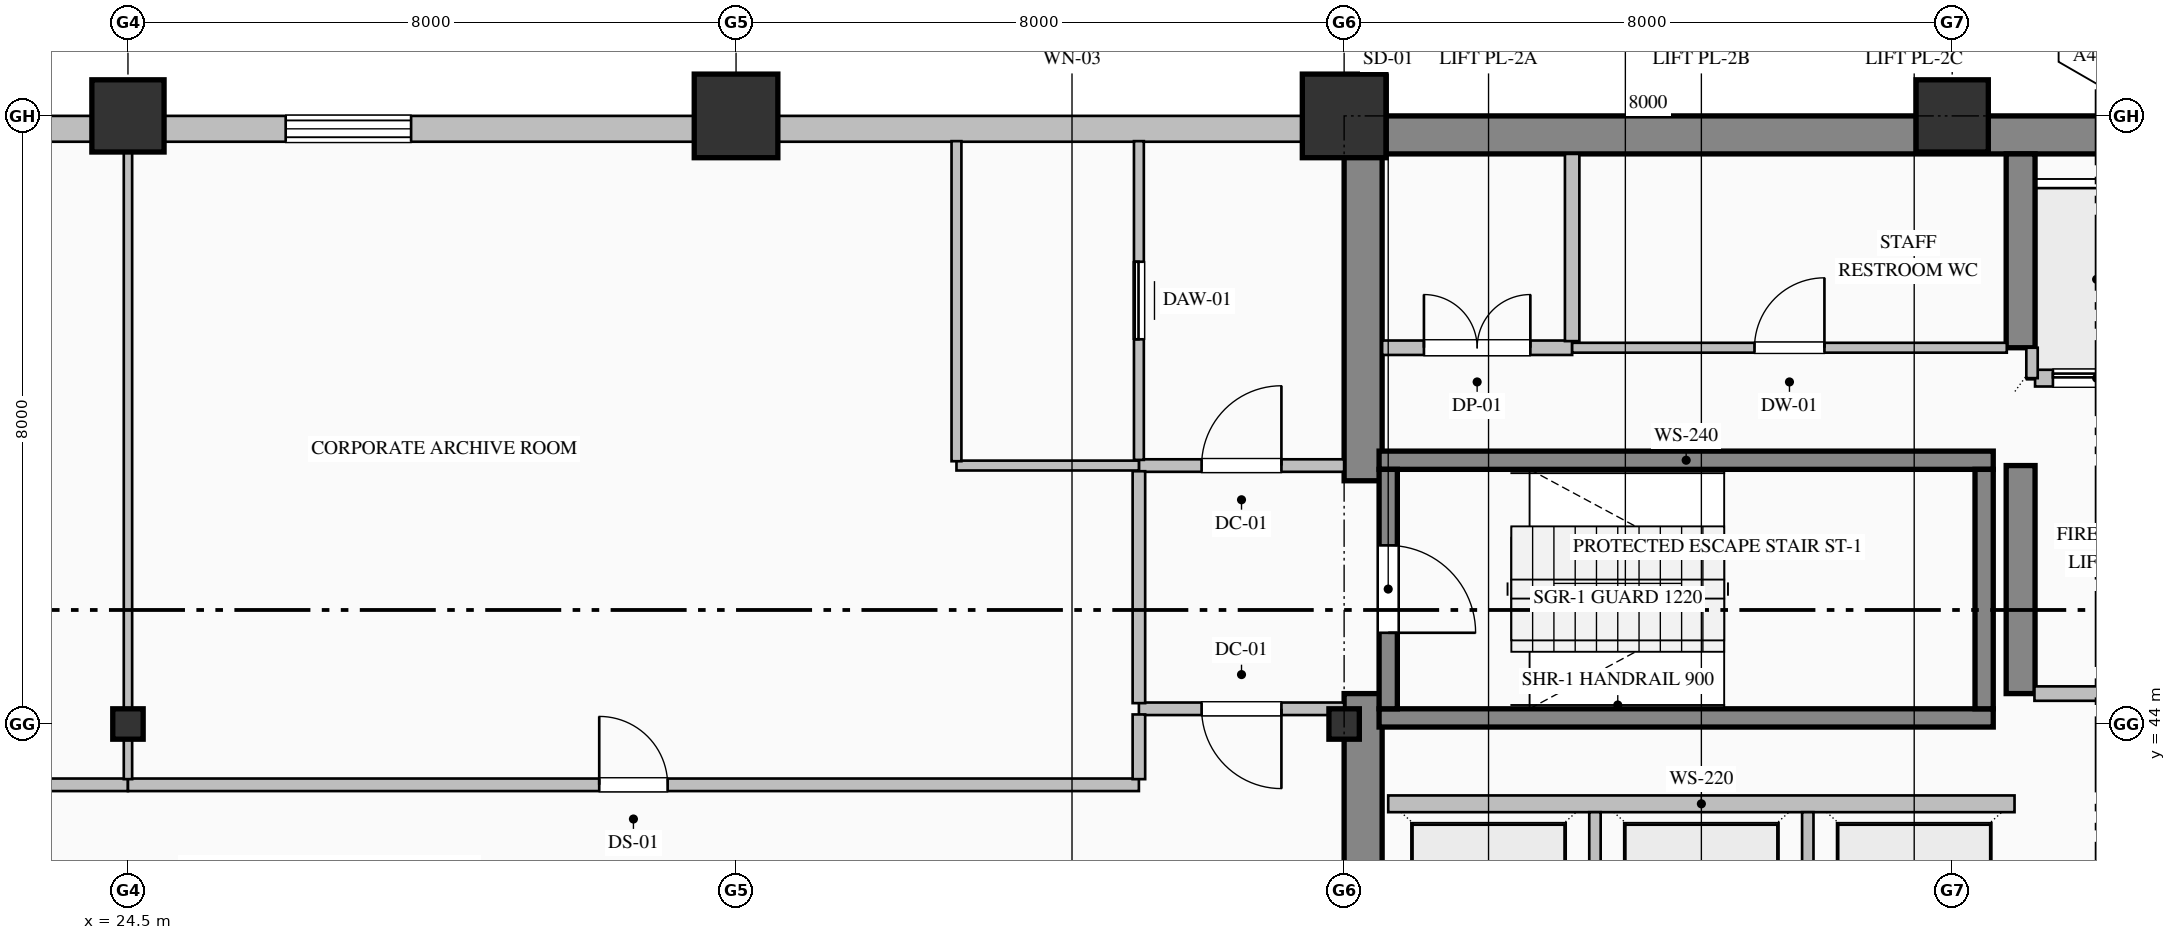
"""IFC4 building model, lengths in metres.
Left out: names, types, materials, properties, quantities, classifications, styles, units other than length and angle.
Written with IfcOpenShell. Run it as: python <this file> out.ifc"""

import sys

from ifc_helpers import new_model, si_unit, direction, frame, frame_2d, origin, origin_2d, place, context, subcontext, project, spatial, rectangle, hollow_rectangle, i_section, extrude, element, fill, save


model = new_model("IFC4")
c1 = context("Model", 3, precision=1e-05, world=origin(), true_north=direction((0.0, 1.0)))
c2 = subcontext(c1, "Body", "Model", "MODEL_VIEW")
j1 = project(units=[si_unit("LENGTHUNIT", "METRE"), si_unit("PLANEANGLEUNIT", "RADIAN")], contexts=[c1])
p1 = place(None, origin())
s1 = spatial("IfcSite", under=j1, at=p1, CompositionType="ELEMENT")
p2 = place(p1, origin())
s2 = spatial("IfcBuilding", under=s1, at=p2, CompositionType="ELEMENT")
p3 = place(p2, frame((0.0, 0.0, 147.0)))
s3 = spatial("IfcBuildingStorey", under=s2, at=p3, CompositionType="ELEMENT", Elevation=147.0)
p4 = place(p3, frame((40.5, 51.75, 0.0), z_axis=(0.0, 0.0, 1.0), x_axis=(1.0, 0.0, 0.0)))
e1 = element("IfcWall", 1, at=p4, inside=s3, PredefinedType="SHEAR", context=c2, shape_type="SweptSolid", body=[
    extrude(rectangle(XDim=23.5, YDim=0.5, at=frame_2d((11.75, 0.0))), origin(), (0.0, 0.0, 1.0), 3.765),
])
p5 = place(p3, frame((40.75, 36.5, 0.0), z_axis=(0.0, 0.0, 1.0), x_axis=(0.0, 1.0, 0.0)))
e2 = element("IfcWall", 2, at=p5, inside=s3, PredefinedType="SHEAR", context=c2, shape_type="SweptSolid", body=[
    extrude(rectangle(XDim=7.9, YDim=0.5, at=frame_2d((3.95, 0.0))), origin(), (0.0, 0.0, 1.0), 3.765),
])
p6 = place(p3, frame((40.75, 47.2, 0.0), z_axis=(0.0, 0.0, 1.0), x_axis=(0.0, 1.0, 0.0)))
e3 = element("IfcWall", 3, at=p6, inside=s3, PredefinedType="SHEAR", context=c2, shape_type="SweptSolid", body=[
    extrude(rectangle(XDim=4.3, YDim=0.5, at=frame_2d((2.15, 0.0))), origin(), (0.0, 0.0, 1.0), 3.765),
])
p7 = place(p3, frame((49.4, 44.4, 0.0), z_axis=(0.0, 0.0, 1.0), x_axis=(0.0, 1.0, 0.0)))
e4 = element("IfcWall", 4, at=p7, inside=s3, PredefinedType="SHEAR", context=c2, shape_type="SweptSolid", body=[
    extrude(rectangle(XDim=3.0, YDim=0.38, at=frame_2d((1.5, 0.0))), origin(), (0.0, 0.0, 1.0), 3.765),
])
p8 = place(p3, frame((49.4, 48.95, 0.0), z_axis=(0.0, 0.0, 1.0), x_axis=(0.0, 1.0, 0.0)))
e5 = element("IfcWall", 5, at=p8, inside=s3, PredefinedType="SHEAR", context=c2, shape_type="SweptSolid", body=[
    extrude(rectangle(XDim=2.55, YDim=0.38, at=frame_2d((1.275, 0.0))), origin(), (0.0, 0.0, 1.0), 3.765),
])
p9 = place(p3, frame((24.5, 44.0, 0.0), z_axis=(0.0, 0.0, 1.0), x_axis=(1.0, 0.0, 0.0)))
e6 = element("IfcColumn", 6, at=p9, inside=s3, PredefinedType="COLUMN", context=c2, shape_type="SweptSolid", body=[
    extrude(i_section(OverallWidth=0.4, OverallDepth=0.4, WebThickness=0.013, FlangeThickness=0.021, FilletRadius=0.022, at=origin_2d()), origin(), (0.0, 0.0, 1.0), 4.0),
])
p10 = place(p3, frame((24.5, 52.0, 0.0), z_axis=(0.0, 0.0, 1.0), x_axis=(1.0, 0.0, 0.0)))
e7 = element("IfcColumn", 7, at=p10, inside=s3, PredefinedType="COLUMN", context=c2, shape_type="SweptSolid", body=[
    extrude(hollow_rectangle(XDim=0.95, YDim=0.95, WallThickness=0.036, at=origin_2d()), origin(), (0.0, 0.0, 1.0), 4.0),
])
p11 = place(p3, frame((32.5, 52.0, 0.0), z_axis=(0.0, 0.0, 1.0), x_axis=(1.0, 0.0, 0.0)))
e8 = element("IfcColumn", 8, at=p11, inside=s3, PredefinedType="COLUMN", context=c2, shape_type="SweptSolid", body=[
    extrude(hollow_rectangle(XDim=1.1, YDim=1.1, WallThickness=0.04, at=origin_2d()), origin(), (0.0, 0.0, 1.0), 4.0),
])
p12 = place(p3, frame((40.5, 44.0, 0.0), z_axis=(0.0, 0.0, 1.0), x_axis=(1.0, 0.0, 0.0)))
e9 = element("IfcColumn", 9, at=p12, inside=s3, PredefinedType="COLUMN", context=c2, shape_type="SweptSolid", body=[
    extrude(i_section(OverallWidth=0.4, OverallDepth=0.4, WebThickness=0.013, FlangeThickness=0.021, FilletRadius=0.022, at=origin_2d()), origin(), (0.0, 0.0, 1.0), 4.0),
])
p13 = place(p3, frame((40.5, 52.0, 0.0), z_axis=(0.0, 0.0, 1.0), x_axis=(1.0, 0.0, 0.0)))
e10 = element("IfcColumn", 10, at=p13, inside=s3, PredefinedType="COLUMN", context=c2, shape_type="SweptSolid", body=[
    extrude(hollow_rectangle(XDim=1.1, YDim=1.1, WallThickness=0.04, at=origin_2d()), origin(), (0.0, 0.0, 1.0), 4.0),
])
p14 = place(p3, frame((48.5, 52.0, 0.0), z_axis=(0.0, 0.0, 1.0), x_axis=(1.0, 0.0, 0.0)))
e11 = element("IfcColumn", 11, at=p14, inside=s3, PredefinedType="COLUMN", context=c2, shape_type="SweptSolid", body=[
    extrude(hollow_rectangle(XDim=0.95, YDim=0.95, WallThickness=0.036, at=origin_2d()), origin(), (0.0, 0.0, 1.0), 4.0),
])
p15 = place(p3, frame((13.0, 51.83, 0.0), z_axis=(0.0, 0.0, 1.0), x_axis=(1.0, 0.0, 0.0)))
e12 = element("IfcWall", 12, at=p15, inside=s3, PredefinedType="SOLIDWALL", context=c2, shape_type="SweptSolid", body=[
    extrude(rectangle(XDim=27.52, YDim=0.34, at=frame_2d((13.76, 0.0))), origin(), (0.0, 0.0, 1.0), 3.265),
])
p16 = place(p15, frame((6.6, 0.0, 0.7)))
e13 = element("IfcOpeningElement", 13, at=p16, cuts=e12, PredefinedType="OPENING", context=c2, shape_type="SweptSolid", body=[
    extrude(rectangle(XDim=1.2, YDim=1.85, at=frame_2d((0.6, 0.925))), frame((0.0, 0.18, 0.0), z_axis=(0.0, -1.0, 0.0), x_axis=(1.0, 0.0, 0.0)), (0.0, 0.0, 1.0), 0.36),
])
p17 = place(p15, frame((13.575, 0.0, 0.85)))
e14 = element("IfcOpeningElement", 14, at=p17, cuts=e12, PredefinedType="OPENING", context=c2, shape_type="SweptSolid", body=[
    extrude(rectangle(XDim=1.65, YDim=1.95, at=frame_2d((0.825, 0.975))), frame((0.0, 0.18, 0.0), z_axis=(0.0, -1.0, 0.0), x_axis=(1.0, 0.0, 0.0)), (0.0, 0.0, 1.0), 0.36),
])
for number, where, z_axis, x_axis in (
    (15, (40.96, 47.47, 0.0), (0.0, 0.0, 1.0), (1.0, 0.0, 0.0)),
    (16, (49.04, 44.08, 0.0), (0.0, 0.0, 1.0), (-1.0, 0.0, 0.0)),
):
    element("IfcWall", number, at=place(p3, frame(where, z_axis=z_axis, x_axis=x_axis)), inside=s3, PredefinedType="SOLIDWALL", context=c2, shape_type="SweptSolid", body=[
        extrude(rectangle(XDim=8.08, YDim=0.24, at=frame_2d((4.04, 0.0))), origin(), (0.0, 0.0, 1.0), 4.0),
    ])
p18 = place(p3, frame((41.08, 47.35, 0.0), z_axis=(0.0, 0.0, 1.0), x_axis=(0.0, -1.0, 0.0)))
e17 = element("IfcWall", 17, at=p18, inside=s3, PredefinedType="SOLIDWALL", context=c2, shape_type="SweptSolid", body=[
    extrude(rectangle(XDim=3.15, YDim=0.24, at=frame_2d((1.575, 0.0))), origin(), (0.0, 0.0, 1.0), 4.0),
])
p19 = place(p18, frame((1.0, 0.0, 0.0)))
e18 = element("IfcOpeningElement", 18, at=p19, cuts=e17, PredefinedType="OPENING", context=c2, shape_type="SweptSolid", body=[
    extrude(rectangle(XDim=1.15, YDim=2.2, at=frame_2d((0.575, 1.1))), frame((0.0, 0.13, 0.0), z_axis=(0.0, -1.0, 0.0), x_axis=(1.0, 0.0, 0.0)), (0.0, 0.0, 1.0), 0.26),
])
p20 = place(p3, frame((48.92, 44.2, 0.0), z_axis=(0.0, 0.0, 1.0), x_axis=(0.0, 1.0, 0.0)))
e19 = element("IfcWall", 19, at=p20, inside=s3, PredefinedType="SOLIDWALL", context=c2, shape_type="SweptSolid", body=[
    extrude(rectangle(XDim=3.15, YDim=0.24, at=frame_2d((1.575, 0.0))), origin(), (0.0, 0.0, 1.0), 4.0),
])
p21 = place(p3, frame((54.71, 48.55, 0.0), z_axis=(0.0, 0.0, 1.0), x_axis=(-1.0, 0.0, 0.0)))
e20 = element("IfcWall", 20, at=p21, inside=s3, PredefinedType="PARTITIONING", context=c2, shape_type="SweptSolid", body=[
    extrude(rectangle(XDim=5.12, YDim=0.22, at=frame_2d((2.56, 0.0))), origin(), (0.0, 0.0, 1.0), 3.765),
])
p22 = place(p21, frame((3.735, 0.0, 0.0)))
e21 = element("IfcOpeningElement", 21, at=p22, cuts=e20, PredefinedType="OPENING", context=c2, shape_type="SweptSolid", body=[
    extrude(rectangle(XDim=1.15, YDim=2.2, at=frame_2d((0.575, 1.1))), frame((0.0, 0.12, 0.0), z_axis=(0.0, -1.0, 0.0), x_axis=(1.0, 0.0, 0.0)), (0.0, 0.0, 1.0), 0.24),
])
p23 = place(p21, frame((0.935, 0.0, 0.0)))
e22 = element("IfcOpeningElement", 22, at=p23, cuts=e20, PredefinedType="OPENING", context=c2, shape_type="SweptSolid", body=[
    extrude(rectangle(XDim=1.15, YDim=2.2, at=frame_2d((0.575, 1.1))), frame((0.0, 0.12, 0.0), z_axis=(0.0, -1.0, 0.0), x_axis=(1.0, 0.0, 0.0)), (0.0, 0.0, 1.0), 0.24),
])
p24 = place(p3, frame((49.55, 48.55, 0.0), z_axis=(0.0, 0.0, 1.0), x_axis=(0.0, 1.0, 0.0)))
e23 = element("IfcWall", 23, at=p24, inside=s3, PredefinedType="PARTITIONING", context=c2, shape_type="SweptSolid", body=[
    extrude(rectangle(XDim=0.4, YDim=0.15, at=frame_2d((0.2, 0.0))), origin(), (0.0, 0.0, 1.0), 3.765),
])
p25 = place(p3, frame((41.08, 42.95, 0.0), z_axis=(0.0, 0.0, 1.0), x_axis=(1.0, 0.0, 0.0)))
e24 = element("IfcWall", 24, at=p25, inside=s3, PredefinedType="PARTITIONING", context=c2, shape_type="SweptSolid", body=[
    extrude(rectangle(XDim=8.24, YDim=0.22, at=frame_2d((4.12, 0.0))), origin(), (0.0, 0.0, 1.0), 3.765),
])
for number, where, z_axis, x_axis in (
    (25, (43.8, 40.76, 0.0), (0.0, 0.0, 1.0), (0.0, 1.0, 0.0)),
    (26, (46.6, 40.76, 0.0), (0.0, 0.0, 1.0), (0.0, 1.0, 0.0)),
):
    element("IfcWall", number, at=place(p3, frame(where, z_axis=z_axis, x_axis=x_axis)), inside=s3, PredefinedType="PARTITIONING", context=c2, shape_type="SweptSolid", body=[
        extrude(rectangle(XDim=2.08, YDim=0.15, at=frame_2d((1.04, 0.0))), origin(), (0.0, 0.0, 1.0), 3.765),
    ])
p26 = place(p3, frame((37.8, 47.4, 0.0), z_axis=(0.0, 0.0, 1.0), x_axis=(1.0, 0.0, 0.0)))
e27 = element("IfcWall", 27, at=p26, inside=s3, PredefinedType="PARTITIONING", context=c2, shape_type="SweptSolid", body=[
    extrude(rectangle(XDim=2.7, YDim=0.165, at=frame_2d((1.35, 0.0))), origin(), (0.0, 0.0, 1.0), 3.765),
])
p27 = place(p26, frame((0.825, 0.0, 0.0)))
e28 = element("IfcOpeningElement", 28, at=p27, cuts=e27, PredefinedType="OPENING", context=c2, shape_type="SweptSolid", body=[
    extrude(rectangle(XDim=1.05, YDim=2.15, at=frame_2d((0.525, 1.075))), frame((0.0, 0.093, 0.0), z_axis=(0.0, -1.0, 0.0), x_axis=(1.0, 0.0, 0.0)), (0.0, 0.0, 1.0), 0.185),
])
p28 = place(p3, frame((40.5, 44.2, 0.0), z_axis=(0.0, 0.0, 1.0), x_axis=(-1.0, 0.0, 0.0)))
e29 = element("IfcWall", 29, at=p28, inside=s3, PredefinedType="PARTITIONING", context=c2, shape_type="SweptSolid", body=[
    extrude(rectangle(XDim=2.7, YDim=0.165, at=frame_2d((1.35, 0.0))), origin(), (0.0, 0.0, 1.0), 3.765),
])
p29 = place(p28, frame((0.825, 0.0, 0.0)))
e30 = element("IfcOpeningElement", 30, at=p29, cuts=e29, PredefinedType="OPENING", context=c2, shape_type="SweptSolid", body=[
    extrude(rectangle(XDim=1.05, YDim=2.15, at=frame_2d((0.525, 1.075))), frame((0.0, 0.093, 0.0), z_axis=(0.0, -1.0, 0.0), x_axis=(1.0, 0.0, 0.0)), (0.0, 0.0, 1.0), 0.185),
])
p30 = place(p3, frame((37.8, 44.274, 0.0), z_axis=(0.0, 0.0, 1.0), x_axis=(0.0, 1.0, 0.0)))
e31 = element("IfcWall", 31, at=p30, inside=s3, PredefinedType="PARTITIONING", context=c2, shape_type="SweptSolid", body=[
    extrude(rectangle(XDim=3.051, YDim=0.165, at=frame_2d((1.525, 0.0))), origin(), (0.0, 0.0, 1.0), 3.765),
])
p31 = place(p3, frame((37.8, 47.475, 0.0), z_axis=(0.0, 0.0, 1.0), x_axis=(0.0, 1.0, 0.0)))
e32 = element("IfcWall", 32, at=p31, inside=s3, PredefinedType="PARTITIONING", context=c2, shape_type="SweptSolid", body=[
    extrude(rectangle(XDim=4.193, YDim=0.13, at=frame_2d((2.097, 0.0))), origin(), (0.0, 0.0, 1.0), 3.765),
])
p32 = place(p31, frame((1.587, 0.0, 0.0)))
e33 = element("IfcOpeningElement", 33, at=p32, cuts=e32, PredefinedType="OPENING", context=c2, shape_type="SweptSolid", body=[
    extrude(rectangle(XDim=1.02, YDim=2.15, at=frame_2d((0.51, 1.075))), frame((0.0, 0.075, 0.0), z_axis=(0.0, -1.0, 0.0), x_axis=(1.0, 0.0, 0.0)), (0.0, 0.0, 1.0), 0.15),
])
p33 = place(p3, frame((37.8, 47.4, 0.0), z_axis=(0.0, 0.0, 1.0), x_axis=(-1.0, 0.0, 0.0)))
e34 = element("IfcWall", 34, at=p33, inside=s3, PredefinedType="PARTITIONING", context=c2, shape_type="SweptSolid", body=[
    extrude(rectangle(XDim=2.4, YDim=0.13, at=frame_2d((1.2, 0.0))), origin(), (0.0, 0.0, 1.0), 3.765),
])
p34 = place(p3, frame((35.4, 47.457, 0.0), z_axis=(0.0, 0.0, 1.0), x_axis=(0.0, 1.0, 0.0)))
e35 = element("IfcWall", 35, at=p34, inside=s3, PredefinedType="PARTITIONING", context=c2, shape_type="SweptSolid", body=[
    extrude(rectangle(XDim=4.211, YDim=0.13, at=frame_2d((2.105, 0.0))), origin(), (0.0, 0.0, 1.0), 3.765),
])
p35 = place(p3, frame((41.0, 48.95, 0.0), z_axis=(0.0, 0.0, 1.0), x_axis=(1.0, 0.0, 0.0)))
e36 = element("IfcWall", 36, at=p35, inside=s3, PredefinedType="PARTITIONING", context=c2, shape_type="SweptSolid", body=[
    extrude(rectangle(XDim=2.5, YDim=0.19, at=frame_2d((1.25, 0.0))), origin(), (0.0, 0.0, 1.0), 3.765),
])
p36 = place(p35, frame((0.55, 0.0, 0.0)))
e37 = element("IfcOpeningElement", 37, at=p36, cuts=e36, PredefinedType="OPENING", context=c2, shape_type="SweptSolid", body=[
    extrude(rectangle(XDim=1.4, YDim=2.25, at=frame_2d((0.7, 1.125))), frame((0.0, 0.105, 0.0), z_axis=(0.0, -1.0, 0.0), x_axis=(1.0, 0.0, 0.0)), (0.0, 0.0, 1.0), 0.21),
])
p37 = place(p3, frame((43.5, 48.95, 0.0), z_axis=(0.0, 0.0, 1.0), x_axis=(1.0, 0.0, 0.0)))
e38 = element("IfcWall", 38, at=p37, inside=s3, PredefinedType="PARTITIONING", context=c2, shape_type="SweptSolid", body=[
    extrude(rectangle(XDim=5.718, YDim=0.13, at=frame_2d((2.859, 0.0))), origin(), (0.0, 0.0, 1.0), 3.765),
])
p38 = place(p37, frame((2.399, 0.0, 0.0)))
e39 = element("IfcOpeningElement", 39, at=p38, cuts=e38, PredefinedType="OPENING", context=c2, shape_type="SweptSolid", body=[
    extrude(rectangle(XDim=0.92, YDim=2.15, at=frame_2d((0.46, 1.075))), frame((0.0, 0.075, 0.0), z_axis=(0.0, -1.0, 0.0), x_axis=(1.0, 0.0, 0.0)), (0.0, 0.0, 1.0), 0.15),
])
p39 = place(p3, frame((54.718, 44.4, 0.0), z_axis=(0.0, 0.0, 1.0), x_axis=(-1.0, 0.0, 0.0)))
e40 = element("IfcWall", 40, at=p39, inside=s3, PredefinedType="PARTITIONING", context=c2, shape_type="SweptSolid", body=[
    extrude(rectangle(XDim=5.136, YDim=0.19, at=frame_2d((2.568, 0.0))), origin(), (0.0, 0.0, 1.0), 3.765),
])
p40 = place(p39, frame((2.043, 0.0, 0.0)))
e41 = element("IfcOpeningElement", 41, at=p40, cuts=e40, PredefinedType="OPENING", context=c2, shape_type="SweptSolid", body=[
    extrude(rectangle(XDim=1.05, YDim=2.15, at=frame_2d((0.525, 1.075))), frame((0.0, 0.105, 0.0), z_axis=(0.0, -1.0, 0.0), x_axis=(1.0, 0.0, 0.0)), (0.0, 0.0, 1.0), 0.21),
])
p41 = place(p3, frame((43.5, 51.5, 0.0), z_axis=(0.0, 0.0, 1.0), x_axis=(0.0, -1.0, 0.0)))
e42 = element("IfcWall", 42, at=p41, inside=s3, PredefinedType="PARTITIONING", context=c2, shape_type="SweptSolid", body=[
    extrude(rectangle(XDim=2.463, YDim=0.19, at=frame_2d((1.231, 0.0))), origin(), (0.0, 0.0, 1.0), 3.765),
])
p42 = place(p3, frame((16.5, 43.2, 0.0), z_axis=(0.0, 0.0, 1.0), x_axis=(1.0, 0.0, 0.0)))
e43 = element("IfcWall", 43, at=p42, inside=s3, PredefinedType="PARTITIONING", context=c2, shape_type="SweptSolid", body=[
    extrude(rectangle(XDim=8.0, YDim=0.165, at=frame_2d((4.0, 0.0))), origin(), (0.0, 0.0, 1.0), 3.765),
])
p43 = place(p3, frame((24.5, 43.2, 0.0), z_axis=(0.0, 0.0, 1.0), x_axis=(1.0, 0.0, 0.0)))
e44 = element("IfcWall", 44, at=p43, inside=s3, PredefinedType="PARTITIONING", context=c2, shape_type="SweptSolid", body=[
    extrude(rectangle(XDim=13.3, YDim=0.165, at=frame_2d((6.65, 0.0))), origin(), (0.0, 0.0, 1.0), 3.765),
])
p44 = place(p43, frame((6.2, 0.0, 0.0)))
e45 = element("IfcOpeningElement", 45, at=p44, cuts=e44, PredefinedType="OPENING", context=c2, shape_type="SweptSolid", body=[
    extrude(rectangle(XDim=0.9, YDim=2.15, at=frame_2d((0.45, 1.075))), frame((0.0, 0.093, 0.0), z_axis=(0.0, -1.0, 0.0), x_axis=(1.0, 0.0, 0.0)), (0.0, 0.0, 1.0), 0.185),
])
p45 = place(p3, frame((37.8, 43.274, 0.0), z_axis=(0.0, 0.0, 1.0), x_axis=(0.0, 1.0, 0.0)))
e46 = element("IfcWall", 46, at=p45, inside=s3, PredefinedType="PARTITIONING", context=c2, shape_type="SweptSolid", body=[
    extrude(rectangle(XDim=0.851, YDim=0.165, at=frame_2d((0.426, 0.0))), origin(), (0.0, 0.0, 1.0), 3.765),
])
p46 = place(p3, frame((24.5, 51.668, 0.0), z_axis=(0.0, 0.0, 1.0), x_axis=(0.0, -1.0, 0.0)))
e47 = element("IfcWall", 47, at=p46, inside=s3, PredefinedType="MOVABLE", context=c2, shape_type="SweptSolid", body=[
    extrude(rectangle(XDim=8.394, YDim=0.11, at=frame_2d((4.197, 0.0))), origin(), (0.0, 0.0, 1.0), 3.157),
])
p47 = place(p17, origin())
e48 = element("IfcWindow", 48, at=p47, inside=s3, PartitioningType="DOUBLE_PANEL_VERTICAL", PredefinedType="WINDOW", context=c2, shape_type="SweptSolid", body=[
    extrude(rectangle(XDim=1.65, YDim=1.95, at=frame_2d((0.825, 0.975))), frame((0.0, 0.15, 0.0), z_axis=(0.0, -1.0, 0.0), x_axis=(1.0, 0.0, 0.0)), (0.0, 0.0, 1.0), 0.06),
])
fill(e14, e48)
p48 = place(p19, origin())
e49 = element("IfcDoor", 49, at=p48, inside=s3, OperationType="SINGLE_SWING_RIGHT", PredefinedType="DOOR", context=c2, shape_type="SweptSolid", body=[
    extrude(rectangle(XDim=1.15, YDim=2.2, at=frame_2d((0.575, 1.1))), frame((0.0, 0.025, 0.0), z_axis=(0.0, -1.0, 0.0), x_axis=(1.0, 0.0, 0.0)), (0.0, 0.0, 1.0), 0.05),
])
fill(e18, e49)
p49 = place(p22, origin())
e50 = element("IfcDoor", 50, at=p49, inside=s3, OperationType="DOUBLE_DOOR_SLIDING", PredefinedType="DOOR", context=c2, shape_type="SweptSolid", body=[
    extrude(rectangle(XDim=1.15, YDim=2.2, at=frame_2d((0.575, 1.1))), frame((0.0, 0.025, 0.0), z_axis=(0.0, -1.0, 0.0), x_axis=(1.0, 0.0, 0.0)), (0.0, 0.0, 1.0), 0.05),
])
fill(e21, e50)
p50 = place(p27, origin())
e51 = element("IfcDoor", 51, at=p50, inside=s3, OperationType="SINGLE_SWING_RIGHT", PredefinedType="DOOR", context=c2, shape_type="SweptSolid", body=[
    extrude(rectangle(XDim=1.05, YDim=2.15, at=frame_2d((0.525, 1.075))), frame((0.0, 0.025, 0.0), z_axis=(0.0, -1.0, 0.0), x_axis=(1.0, 0.0, 0.0)), (0.0, 0.0, 1.0), 0.05),
])
fill(e28, e51)
p51 = place(p29, origin())
e52 = element("IfcDoor", 52, at=p51, inside=s3, OperationType="SINGLE_SWING_LEFT", PredefinedType="DOOR", context=c2, shape_type="SweptSolid", body=[
    extrude(rectangle(XDim=1.05, YDim=2.15, at=frame_2d((0.525, 1.075))), frame((0.0, 0.025, 0.0), z_axis=(0.0, -1.0, 0.0), x_axis=(1.0, 0.0, 0.0)), (0.0, 0.0, 1.0), 0.05),
])
fill(e30, e52)
p52 = place(p32, origin())
e53 = element("IfcDoor", 53, at=p52, inside=s3, OperationType="SLIDING_TO_LEFT", PredefinedType="DOOR", context=c2, shape_type="SweptSolid", body=[
    extrude(rectangle(XDim=1.02, YDim=2.15, at=frame_2d((0.51, 1.075))), frame((0.0, 0.025, 0.0), z_axis=(0.0, -1.0, 0.0), x_axis=(1.0, 0.0, 0.0)), (0.0, 0.0, 1.0), 0.05),
])
fill(e33, e53)
p53 = place(p36, origin())
e54 = element("IfcDoor", 54, at=p53, inside=s3, OperationType="DOUBLE_DOOR_SINGLE_SWING", PredefinedType="DOOR", context=c2, shape_type="SweptSolid", body=[
    extrude(rectangle(XDim=1.4, YDim=2.25, at=frame_2d((0.7, 1.125))), frame((0.0, 0.025, 0.0), z_axis=(0.0, -1.0, 0.0), x_axis=(1.0, 0.0, 0.0)), (0.0, 0.0, 1.0), 0.05),
])
fill(e37, e54)
p54 = place(p38, origin())
e55 = element("IfcDoor", 55, at=p54, inside=s3, OperationType="SINGLE_SWING_RIGHT", PredefinedType="DOOR", context=c2, shape_type="SweptSolid", body=[
    extrude(rectangle(XDim=0.92, YDim=2.15, at=frame_2d((0.46, 1.075))), frame((0.0, 0.025, 0.0), z_axis=(0.0, -1.0, 0.0), x_axis=(1.0, 0.0, 0.0)), (0.0, 0.0, 1.0), 0.05),
])
fill(e39, e55)
p55 = place(p44, origin())
e56 = element("IfcDoor", 56, at=p55, inside=s3, OperationType="SINGLE_SWING_LEFT", PredefinedType="DOOR", context=c2, shape_type="SweptSolid", body=[
    extrude(rectangle(XDim=0.9, YDim=2.15, at=frame_2d((0.45, 1.075))), frame((0.0, 0.025, 0.0), z_axis=(0.0, -1.0, 0.0), x_axis=(1.0, 0.0, 0.0)), (0.0, 0.0, 1.0), 0.05),
])
fill(e45, e56)
save(model, sys.argv[1])
